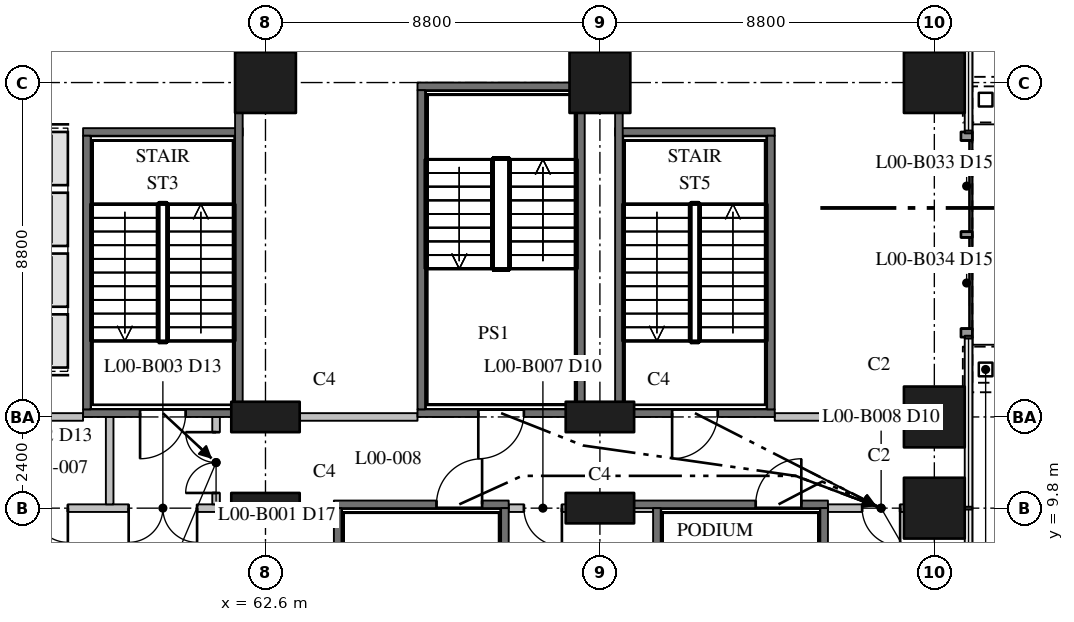
"""IFC4 building model, lengths in metres.
Left out: names, types, materials, properties, quantities, classifications, styles, units other than length and angle.
Written with IfcOpenShell. Run it as: python <this file> out.ifc"""

import sys

from ifc_helpers import new_model, si_unit, direction, frame, frame_2d, origin, origin_2d, place, context, subcontext, project, spatial, rectangle, hollow_rectangle, extrude, element, fill, save


model = new_model("IFC4")
c1 = context("Model", 3, precision=1e-05, world=origin(), true_north=direction((0.0, 1.0)))
c2 = subcontext(c1, "Body", "Model", "MODEL_VIEW")
j1 = project(units=[si_unit("LENGTHUNIT", "METRE"), si_unit("PLANEANGLEUNIT", "RADIAN")], contexts=[c1])
p1 = place(None, origin())
s1 = spatial("IfcSite", under=j1, at=p1, CompositionType="ELEMENT")
p2 = place(p1, origin())
s2 = spatial("IfcBuilding", under=s1, at=p2, CompositionType="ELEMENT")
p3 = place(p2, origin())
s3 = spatial("IfcBuildingStorey", under=s2, at=p3, CompositionType="ELEMENT", Elevation=0.0)
for number, where, z_axis, x_axis in (
    (1, (62.6, 9.8, 0.0), (0.0, 0.0, 1.0), (1.0, 0.0, 0.0)),
    (2, (62.6, 12.2, 0.0), (0.0, 0.0, 1.0), (1.0, 0.0, 0.0)),
):
    element("IfcColumn", number, at=place(p3, frame(where, z_axis=z_axis, x_axis=x_axis)), inside=s3, PredefinedType="COLUMN", context=c2, shape_type="SweptSolid", body=[
        extrude(rectangle(XDim=1.8, YDim=0.8, at=origin_2d()), origin(), (0.0, 0.0, 1.0), 7.5),
    ])
p4 = place(p3, frame((62.6, 21.0, 0.0), z_axis=(0.0, 0.0, 1.0), x_axis=(1.0, 0.0, 0.0)))
e3 = element("IfcColumn", 3, at=p4, inside=s3, PredefinedType="COLUMN", context=c2, shape_type="SweptSolid", body=[
    extrude(rectangle(XDim=1.6, YDim=1.6, at=origin_2d()), origin(), (0.0, 0.0, 1.0), 7.5),
])
for number, where, z_axis, x_axis in (
    (4, (71.4, 9.8, 0.0), (0.0, 0.0, 1.0), (1.0, 0.0, 0.0)),
    (5, (71.4, 12.2, 0.0), (0.0, 0.0, 1.0), (1.0, 0.0, 0.0)),
):
    element("IfcColumn", number, at=place(p3, frame(where, z_axis=z_axis, x_axis=x_axis)), inside=s3, PredefinedType="COLUMN", context=c2, shape_type="SweptSolid", body=[
        extrude(rectangle(XDim=1.8, YDim=0.8, at=origin_2d()), origin(), (0.0, 0.0, 1.0), 7.5),
    ])
for number, where, z_axis, x_axis in (
    (6, (71.4, 21.0, 0.0), (0.0, 0.0, 1.0), (1.0, 0.0, 0.0)),
    (7, (80.2, 9.8, 0.0), (0.0, 0.0, 1.0), (1.0, 0.0, 0.0)),
    (8, (80.2, 12.2, 0.0), (0.0, 0.0, 1.0), (1.0, 0.0, 0.0)),
    (9, (80.2, 21.0, 0.0), (0.0, 0.0, 1.0), (1.0, 0.0, 0.0)),
):
    element("IfcColumn", number, at=place(p3, frame(where, z_axis=z_axis, x_axis=x_axis)), inside=s3, PredefinedType="COLUMN", context=c2, shape_type="SweptSolid", body=[
        extrude(rectangle(XDim=1.6, YDim=1.6, at=origin_2d()), origin(), (0.0, 0.0, 1.0), 7.5),
    ])
for number, where, z_axis, x_axis in (
    (10, (81.55, 13.45, 0.0), (0.0, 0.0, 1.0), (1.0, 0.0, 0.0)),
    (11, (81.55, 20.55, 0.0), (0.0, 0.0, 1.0), (1.0, 0.0, 0.0)),
):
    element("IfcColumn", number, at=place(p3, frame(where, z_axis=z_axis, x_axis=x_axis)), inside=s3, PredefinedType="COLUMN", context=c2, shape_type="SweptSolid", body=[
        extrude(hollow_rectangle(XDim=0.356, YDim=0.356, WallThickness=0.013, at=origin_2d()), origin(), (0.0, 0.0, 1.0), 7.1),
    ])
p5 = place(p3, frame((57.8, 12.3, 0.0), z_axis=(0.0, 0.0, 1.0), x_axis=(1.0, 0.0, 0.0)))
e12 = element("IfcWall", 12, at=p5, inside=s3, PredefinedType="SHEAR", context=c2, shape_type="SweptSolid", body=[
    extrude(rectangle(XDim=4.2, YDim=0.2, at=frame_2d((2.1, 0.0))), origin(), (0.0, 0.0, 1.0), 7.1),
])
p6 = place(p5, frame((1.5, 0.0, 0.0)))
e13 = element("IfcOpeningElement", 13, at=p6, cuts=e12, PredefinedType="OPENING", context=c2, shape_type="SweptSolid", body=[
    extrude(rectangle(XDim=1.2, YDim=2.1, at=frame_2d((0.6, 1.05))), frame((0.0, 0.11, 0.0), z_axis=(0.0, -1.0, 0.0), x_axis=(1.0, 0.0, 0.0)), (0.0, 0.0, 1.0), 0.22),
])
p7 = place(p3, frame((57.8, 19.7, 0.0), z_axis=(0.0, 0.0, 1.0), x_axis=(1.0, 0.0, 0.0)))
e14 = element("IfcWall", 14, at=p7, inside=s3, PredefinedType="SHEAR", context=c2, shape_type="SweptSolid", body=[
    extrude(rectangle(XDim=4.2, YDim=0.2, at=frame_2d((2.1, 0.0))), origin(), (0.0, 0.0, 1.0), 7.1),
])
p8 = place(p3, frame((57.9, 12.4, 0.0), z_axis=(0.0, 0.0, 1.0), x_axis=(0.0, 1.0, 0.0)))
e15 = element("IfcWall", 15, at=p8, inside=s3, PredefinedType="SHEAR", context=c2, shape_type="SweptSolid", body=[
    extrude(rectangle(XDim=7.2, YDim=0.2, at=frame_2d((3.6, 0.0))), origin(), (0.0, 0.0, 1.0), 7.1),
])
p9 = place(p3, frame((61.9, 12.4, 0.0), z_axis=(0.0, 0.0, 1.0), x_axis=(0.0, 1.0, 0.0)))
e16 = element("IfcWall", 16, at=p9, inside=s3, PredefinedType="SHEAR", context=c2, shape_type="SweptSolid", body=[
    extrude(rectangle(XDim=7.8, YDim=0.2, at=frame_2d((3.9, 0.0))), origin(), (0.0, 0.0, 1.0), 7.1),
])
p10 = place(p3, frame((71.8, 12.3, 0.0), z_axis=(0.0, 0.0, 1.0), x_axis=(1.0, 0.0, 0.0)))
e17 = element("IfcWall", 17, at=p10, inside=s3, PredefinedType="SHEAR", context=c2, shape_type="SweptSolid", body=[
    extrude(rectangle(XDim=4.2, YDim=0.2, at=frame_2d((2.1, 0.0))), origin(), (0.0, 0.0, 1.0), 7.1),
])
p11 = place(p10, frame((1.5, 0.0, 0.0)))
e18 = element("IfcOpeningElement", 18, at=p11, cuts=e17, PredefinedType="OPENING", context=c2, shape_type="SweptSolid", body=[
    extrude(rectangle(XDim=1.2, YDim=2.1, at=frame_2d((0.6, 1.05))), frame((0.0, 0.11, 0.0), z_axis=(0.0, -1.0, 0.0), x_axis=(1.0, 0.0, 0.0)), (0.0, 0.0, 1.0), 0.22),
])
p12 = place(p3, frame((71.8, 19.7, 0.0), z_axis=(0.0, 0.0, 1.0), x_axis=(1.0, 0.0, 0.0)))
e19 = element("IfcWall", 19, at=p12, inside=s3, PredefinedType="SHEAR", context=c2, shape_type="SweptSolid", body=[
    extrude(rectangle(XDim=4.2, YDim=0.2, at=frame_2d((2.1, 0.0))), origin(), (0.0, 0.0, 1.0), 7.1),
])
p13 = place(p3, frame((71.9, 12.4, 0.0), z_axis=(0.0, 0.0, 1.0), x_axis=(0.0, 1.0, 0.0)))
e20 = element("IfcWall", 20, at=p13, inside=s3, PredefinedType="SHEAR", context=c2, shape_type="SweptSolid", body=[
    extrude(rectangle(XDim=7.8, YDim=0.2, at=frame_2d((3.9, 0.0))), origin(), (0.0, 0.0, 1.0), 7.1),
])
p14 = place(p3, frame((75.9, 12.4, 0.0), z_axis=(0.0, 0.0, 1.0), x_axis=(0.0, 1.0, 0.0)))
e21 = element("IfcWall", 21, at=p14, inside=s3, PredefinedType="SHEAR", context=c2, shape_type="SweptSolid", body=[
    extrude(rectangle(XDim=7.2, YDim=0.2, at=frame_2d((3.6, 0.0))), origin(), (0.0, 0.0, 1.0), 7.1),
])
p15 = place(p3, frame((66.6, 12.3, 0.0), z_axis=(0.0, 0.0, 1.0), x_axis=(1.0, 0.0, 0.0)))
e22 = element("IfcWall", 22, at=p15, inside=s3, PredefinedType="SHEAR", context=c2, shape_type="SweptSolid", body=[
    extrude(rectangle(XDim=4.4, YDim=0.2, at=frame_2d((2.2, 0.0))), origin(), (0.0, 0.0, 1.0), 7.1),
])
p16 = place(p15, frame((1.6, 0.0, 0.0)))
e23 = element("IfcOpeningElement", 23, at=p16, cuts=e22, PredefinedType="OPENING", context=c2, shape_type="SweptSolid", body=[
    extrude(rectangle(XDim=1.2, YDim=2.1, at=frame_2d((0.6, 1.05))), frame((0.0, 0.11, 0.0), z_axis=(0.0, -1.0, 0.0), x_axis=(1.0, 0.0, 0.0)), (0.0, 0.0, 1.0), 0.22),
])
p17 = place(p3, frame((66.6, 20.9, 0.0), z_axis=(0.0, 0.0, 1.0), x_axis=(1.0, 0.0, 0.0)))
e24 = element("IfcWall", 24, at=p17, inside=s3, PredefinedType="SHEAR", context=c2, shape_type="SweptSolid", body=[
    extrude(rectangle(XDim=4.4, YDim=0.2, at=frame_2d((2.2, 0.0))), origin(), (0.0, 0.0, 1.0), 7.1),
])
for number, where, z_axis, x_axis in (
    (25, (66.7, 12.4, 0.0), (0.0, 0.0, 1.0), (0.0, 1.0, 0.0)),
    (26, (70.9, 12.4, 0.0), (0.0, 0.0, 1.0), (0.0, 1.0, 0.0)),
):
    element("IfcWall", number, at=place(p3, frame(where, z_axis=z_axis, x_axis=x_axis)), inside=s3, PredefinedType="SHEAR", context=c2, shape_type="SweptSolid", body=[
        extrude(rectangle(XDim=8.4, YDim=0.2, at=frame_2d((4.2, 0.0))), origin(), (0.0, 0.0, 1.0), 7.1),
    ])
p18 = place(p3, frame((64.4, 9.9, 0.0), z_axis=(0.0, 0.0, 1.0), x_axis=(1.0, 0.0, 0.0)))
e27 = element("IfcWall", 27, at=p18, inside=s3, PredefinedType="SHEAR", context=c2, shape_type="SweptSolid", body=[
    extrude(rectangle(XDim=4.6, YDim=0.2, at=frame_2d((2.3, 0.0))), origin(), (0.0, 0.0, 1.0), 7.1),
])
p19 = place(p18, frame((2.7, 0.0, 0.0)))
e28 = element("IfcOpeningElement", 28, at=p19, cuts=e27, PredefinedType="OPENING", context=c2, shape_type="SweptSolid", body=[
    extrude(rectangle(XDim=1.2, YDim=2.1, at=frame_2d((0.6, 1.05))), frame((0.0, 0.11, 0.0), z_axis=(0.0, -1.0, 0.0), x_axis=(1.0, 0.0, 0.0)), (0.0, 0.0, 1.0), 0.22),
])
for number, where, z_axis, x_axis in (
    (29, (64.5, 1.4, 0.0), (0.0, 0.0, 1.0), (0.0, 1.0, 0.0)),
    (30, (68.9, 1.4, 0.0), (0.0, 0.0, 1.0), (0.0, 1.0, 0.0)),
):
    element("IfcWall", number, at=place(p3, frame(where, z_axis=z_axis, x_axis=x_axis)), inside=s3, PredefinedType="SHEAR", context=c2, shape_type="SweptSolid", body=[
        extrude(rectangle(XDim=8.4, YDim=0.2, at=frame_2d((4.2, 0.0))), origin(), (0.0, 0.0, 1.0), 7.1),
    ])
p20 = place(p3, frame((72.3, 9.9, 0.0), z_axis=(0.0, 0.0, 1.0), x_axis=(1.0, 0.0, 0.0)))
e31 = element("IfcWall", 31, at=p20, inside=s3, PredefinedType="SHEAR", context=c2, shape_type="SweptSolid", body=[
    extrude(rectangle(XDim=5.1, YDim=0.2, at=frame_2d((2.55, 0.0))), origin(), (0.0, 0.0, 1.0), 7.1),
])
p21 = place(p20, frame((3.2, 0.0, 0.0)))
e32 = element("IfcOpeningElement", 32, at=p21, cuts=e31, PredefinedType="OPENING", context=c2, shape_type="SweptSolid", body=[
    extrude(rectangle(XDim=1.2, YDim=2.1, at=frame_2d((0.6, 1.05))), frame((0.0, 0.11, 0.0), z_axis=(0.0, -1.0, 0.0), x_axis=(1.0, 0.0, 0.0)), (0.0, 0.0, 1.0), 0.22),
])
for number, where, z_axis, x_axis in (
    (33, (72.9, 1.4, 0.0), (0.0, 0.0, 1.0), (0.0, 1.0, 0.0)),
    (34, (77.3, 1.4, 0.0), (0.0, 0.0, 1.0), (0.0, 1.0, 0.0)),
):
    element("IfcWall", number, at=place(p3, frame(where, z_axis=z_axis, x_axis=x_axis)), inside=s3, PredefinedType="SHEAR", context=c2, shape_type="SweptSolid", body=[
        extrude(rectangle(XDim=8.4, YDim=0.2, at=frame_2d((4.2, 0.0))), origin(), (0.0, 0.0, 1.0), 7.1),
    ])
p22 = place(p3, frame((45.0, 9.8, 0.0), z_axis=(0.0, 0.0, 1.0), x_axis=(1.0, 0.0, 0.0)))
e35 = element("IfcWall", 35, at=p22, inside=s3, PredefinedType="PARTITIONING", context=c2, shape_type="SweptSolid", body=[
    extrude(rectangle(XDim=19.4, YDim=0.2, at=frame_2d((9.7, 0.0))), origin(), (0.0, 0.0, 1.0), 7.1),
])
p23 = place(p22, frame((10.6, 0.0, 0.0)))
e36 = element("IfcOpeningElement", 36, at=p23, cuts=e35, PredefinedType="OPENING", context=c2, shape_type="SweptSolid", body=[
    extrude(rectangle(XDim=1.8, YDim=2.1, at=frame_2d((0.9, 1.05))), frame((0.0, 0.11, 0.0), z_axis=(0.0, -1.0, 0.0), x_axis=(1.0, 0.0, 0.0)), (0.0, 0.0, 1.0), 0.22),
])
p24 = place(p22, frame((14.0, 0.0, 0.0)))
e37 = element("IfcOpeningElement", 37, at=p24, cuts=e35, PredefinedType="OPENING", context=c2, shape_type="SweptSolid", body=[
    extrude(rectangle(XDim=1.8, YDim=2.1, at=frame_2d((0.9, 1.05))), frame((0.0, 0.11, 0.0), z_axis=(0.0, -1.0, 0.0), x_axis=(1.0, 0.0, 0.0)), (0.0, 0.0, 1.0), 0.22),
])
p25 = place(p3, frame((69.0, 9.8, 0.0), z_axis=(0.0, 0.0, 1.0), x_axis=(1.0, 0.0, 0.0)))
e38 = element("IfcWall", 38, at=p25, inside=s3, PredefinedType="PARTITIONING", context=c2, shape_type="SweptSolid", body=[
    extrude(rectangle(XDim=3.8, YDim=0.2, at=frame_2d((1.9, 0.0))), origin(), (0.0, 0.0, 1.0), 7.1),
])
p26 = place(p25, frame((0.4, 0.0, 0.0)))
e39 = element("IfcOpeningElement", 39, at=p26, cuts=e38, PredefinedType="OPENING", context=c2, shape_type="SweptSolid", body=[
    extrude(rectangle(XDim=1.0, YDim=2.1, at=frame_2d((0.5, 1.05))), frame((0.0, 0.11, 0.0), z_axis=(0.0, -1.0, 0.0), x_axis=(1.0, 0.0, 0.0)), (0.0, 0.0, 1.0), 0.22),
])
p27 = place(p3, frame((77.4, 9.8, 0.0), z_axis=(0.0, 0.0, 1.0), x_axis=(1.0, 0.0, 0.0)))
e40 = element("IfcWall", 40, at=p27, inside=s3, PredefinedType="PARTITIONING", context=c2, shape_type="SweptSolid", body=[
    extrude(rectangle(XDim=3.6, YDim=0.2, at=frame_2d((1.8, 0.0))), origin(), (0.0, 0.0, 1.0), 7.1),
])
p28 = place(p27, frame((0.9, 0.0, 0.0)))
e41 = element("IfcOpeningElement", 41, at=p28, cuts=e40, PredefinedType="OPENING", context=c2, shape_type="SweptSolid", body=[
    extrude(rectangle(XDim=1.0, YDim=2.1, at=frame_2d((0.5, 1.05))), frame((0.0, 0.11, 0.0), z_axis=(0.0, -1.0, 0.0), x_axis=(1.0, 0.0, 0.0)), (0.0, 0.0, 1.0), 0.22),
])
p29 = place(p3, frame((35.4, 12.2, 0.0), z_axis=(0.0, 0.0, 1.0), x_axis=(1.0, 0.0, 0.0)))
e42 = element("IfcWall", 42, at=p29, inside=s3, PredefinedType="PARTITIONING", context=c2, shape_type="SweptSolid", body=[
    extrude(rectangle(XDim=22.4, YDim=0.2, at=frame_2d((11.2, 0.0))), origin(), (0.0, 0.0, 1.0), 7.1),
])
p30 = place(p3, frame((62.0, 12.2, 0.0), z_axis=(0.0, 0.0, 1.0), x_axis=(1.0, 0.0, 0.0)))
e43 = element("IfcWall", 43, at=p30, inside=s3, PredefinedType="PARTITIONING", context=c2, shape_type="SweptSolid", body=[
    extrude(rectangle(XDim=4.6, YDim=0.2, at=frame_2d((2.3, 0.0))), origin(), (0.0, 0.0, 1.0), 7.1),
])
p31 = place(p3, frame((71.0, 12.2, 0.0), z_axis=(0.0, 0.0, 1.0), x_axis=(1.0, 0.0, 0.0)))
e44 = element("IfcWall", 44, at=p31, inside=s3, PredefinedType="PARTITIONING", context=c2, shape_type="SweptSolid", body=[
    extrude(rectangle(XDim=0.8, YDim=0.2, at=frame_2d((0.4, 0.0))), origin(), (0.0, 0.0, 1.0), 7.1),
])
p32 = place(p3, frame((76.0, 12.2, 0.0), z_axis=(0.0, 0.0, 1.0), x_axis=(1.0, 0.0, 0.0)))
e45 = element("IfcWall", 45, at=p32, inside=s3, PredefinedType="PARTITIONING", context=c2, shape_type="SweptSolid", body=[
    extrude(rectangle(XDim=5.0, YDim=0.2, at=frame_2d((2.5, 0.0))), origin(), (0.0, 0.0, 1.0), 7.1),
])
p33 = place(p3, frame((58.5, 9.9, 0.0), z_axis=(0.0, 0.0, 1.0), x_axis=(0.0, 1.0, 0.0)))
e46 = element("IfcWall", 46, at=p33, inside=s3, PredefinedType="PARTITIONING", context=c2, shape_type="SweptSolid", body=[
    extrude(rectangle(XDim=2.3, YDim=0.2, at=frame_2d((1.15, 0.0))), origin(), (0.0, 0.0, 1.0), 7.1),
])
p34 = place(p3, frame((61.3, 9.9, 0.0), z_axis=(0.0, 0.0, 1.0), x_axis=(0.0, 1.0, 0.0)))
e47 = element("IfcWall", 47, at=p34, inside=s3, PredefinedType="PARTITIONING", context=c2, shape_type="SweptSolid", body=[
    extrude(rectangle(XDim=2.3, YDim=0.2, at=frame_2d((1.15, 0.0))), origin(), (0.0, 0.0, 1.0), 7.1),
])
p35 = place(p34, frame((0.3, 0.0, 0.0)))
e48 = element("IfcOpeningElement", 48, at=p35, cuts=e47, PredefinedType="OPENING", context=c2, shape_type="SweptSolid", body=[
    extrude(rectangle(XDim=1.6, YDim=2.1, at=frame_2d((0.8, 1.05))), frame((0.0, 0.11, 0.0), z_axis=(0.0, -1.0, 0.0), x_axis=(1.0, 0.0, 0.0)), (0.0, 0.0, 1.0), 0.22),
])
p36 = place(p3, frame((81.05, 19.7, 0.0), z_axis=(0.0, 0.0, 1.0), x_axis=(0.0, -1.0, 0.0)))
e49 = element("IfcWall", 49, at=p36, inside=s3, PredefinedType="STANDARD", context=c2, shape_type="SweptSolid", body=[
    extrude(rectangle(XDim=5.4, YDim=0.3, at=frame_2d((2.7, 0.0))), origin(), (0.0, 0.0, 1.0), 7.1),
])
p37 = place(p36, frame((0.225, 0.0, 0.0)))
e50 = element("IfcOpeningElement", 50, at=p37, cuts=e49, PredefinedType="OPENING", context=c2, shape_type="SweptSolid", body=[
    extrude(rectangle(XDim=2.4, YDim=2.4, at=frame_2d((1.2, 1.2))), frame((0.0, 0.16, 0.0), z_axis=(0.0, -1.0, 0.0), x_axis=(1.0, 0.0, 0.0)), (0.0, 0.0, 1.0), 0.32),
])
p38 = place(p36, frame((2.775, 0.0, 0.0)))
e51 = element("IfcOpeningElement", 51, at=p38, cuts=e49, PredefinedType="OPENING", context=c2, shape_type="SweptSolid", body=[
    extrude(rectangle(XDim=2.4, YDim=2.4, at=frame_2d((1.2, 1.2))), frame((0.0, 0.16, 0.0), z_axis=(0.0, -1.0, 0.0), x_axis=(1.0, 0.0, 0.0)), (0.0, 0.0, 1.0), 0.32),
])
p39 = place(p6, frame((1.2, 0.0, 0.0), z_axis=(0.0, 0.0, 1.0), x_axis=(-1.0, 0.0, 0.0)))
e52 = element("IfcDoor", 52, at=p39, inside=s3, OperationType="SINGLE_SWING_LEFT", PredefinedType="DOOR", context=c2, shape_type="SweptSolid", body=[
    extrude(rectangle(XDim=1.2, YDim=2.1, at=frame_2d((0.6, 1.05))), frame((0.0, 0.025, 0.0), z_axis=(0.0, -1.0, 0.0), x_axis=(1.0, 0.0, 0.0)), (0.0, 0.0, 1.0), 0.05),
])
fill(e13, e52)
p40 = place(p11, frame((1.2, 0.0, 0.0), z_axis=(0.0, 0.0, 1.0), x_axis=(-1.0, 0.0, 0.0)))
e53 = element("IfcDoor", 53, at=p40, inside=s3, OperationType="SINGLE_SWING_LEFT", PredefinedType="DOOR", context=c2, shape_type="SweptSolid", body=[
    extrude(rectangle(XDim=1.2, YDim=2.1, at=frame_2d((0.6, 1.05))), frame((0.0, 0.025, 0.0), z_axis=(0.0, -1.0, 0.0), x_axis=(1.0, 0.0, 0.0)), (0.0, 0.0, 1.0), 0.05),
])
fill(e18, e53)
p41 = place(p16, frame((1.2, 0.0, 0.0), z_axis=(0.0, 0.0, 1.0), x_axis=(-1.0, 0.0, 0.0)))
e54 = element("IfcDoor", 54, at=p41, inside=s3, OperationType="SINGLE_SWING_LEFT", PredefinedType="DOOR", context=c2, shape_type="SweptSolid", body=[
    extrude(rectangle(XDim=1.2, YDim=2.1, at=frame_2d((0.6, 1.05))), frame((0.0, 0.025, 0.0), z_axis=(0.0, -1.0, 0.0), x_axis=(1.0, 0.0, 0.0)), (0.0, 0.0, 1.0), 0.05),
])
fill(e23, e54)
p42 = place(p19, origin())
e55 = element("IfcDoor", 55, at=p42, inside=s3, OperationType="SINGLE_SWING_RIGHT", PredefinedType="DOOR", context=c2, shape_type="SweptSolid", body=[
    extrude(rectangle(XDim=1.2, YDim=2.1, at=frame_2d((0.6, 1.05))), frame((0.0, 0.025, 0.0), z_axis=(0.0, -1.0, 0.0), x_axis=(1.0, 0.0, 0.0)), (0.0, 0.0, 1.0), 0.05),
])
fill(e28, e55)
p43 = place(p21, origin())
e56 = element("IfcDoor", 56, at=p43, inside=s3, OperationType="SINGLE_SWING_RIGHT", PredefinedType="DOOR", context=c2, shape_type="SweptSolid", body=[
    extrude(rectangle(XDim=1.2, YDim=2.1, at=frame_2d((0.6, 1.05))), frame((0.0, 0.025, 0.0), z_axis=(0.0, -1.0, 0.0), x_axis=(1.0, 0.0, 0.0)), (0.0, 0.0, 1.0), 0.05),
])
fill(e32, e56)
p44 = place(p35, origin())
e57 = element("IfcDoor", 57, at=p44, inside=s3, OperationType="DOUBLE_DOOR_SINGLE_SWING", PredefinedType="DOOR", context=c2, shape_type="SweptSolid", body=[
    extrude(rectangle(XDim=1.6, YDim=2.1, at=frame_2d((0.8, 1.05))), frame((0.0, 0.025, 0.0), z_axis=(0.0, -1.0, 0.0), x_axis=(1.0, 0.0, 0.0)), (0.0, 0.0, 1.0), 0.05),
])
fill(e48, e57)
p45 = place(p23, frame((1.8, 0.0, 0.0), z_axis=(0.0, 0.0, 1.0), x_axis=(-1.0, 0.0, 0.0)))
e58 = element("IfcDoor", 58, at=p45, inside=s3, OperationType="DOUBLE_DOOR_SINGLE_SWING", PredefinedType="DOOR", context=c2, shape_type="SweptSolid", body=[
    extrude(rectangle(XDim=1.8, YDim=2.1, at=frame_2d((0.9, 1.05))), frame((0.0, 0.025, 0.0), z_axis=(0.0, -1.0, 0.0), x_axis=(1.0, 0.0, 0.0)), (0.0, 0.0, 1.0), 0.05),
])
fill(e36, e58)
p46 = place(p24, frame((1.8, 0.0, 0.0), z_axis=(0.0, 0.0, 1.0), x_axis=(-1.0, 0.0, 0.0)))
e59 = element("IfcDoor", 59, at=p46, inside=s3, OperationType="DOUBLE_DOOR_SINGLE_SWING", PredefinedType="DOOR", context=c2, shape_type="SweptSolid", body=[
    extrude(rectangle(XDim=1.8, YDim=2.1, at=frame_2d((0.9, 1.05))), frame((0.0, 0.025, 0.0), z_axis=(0.0, -1.0, 0.0), x_axis=(1.0, 0.0, 0.0)), (0.0, 0.0, 1.0), 0.05),
])
fill(e37, e59)
p47 = place(p26, frame((1.0, 0.0, 0.0), z_axis=(0.0, 0.0, 1.0), x_axis=(-1.0, 0.0, 0.0)))
e60 = element("IfcDoor", 60, at=p47, inside=s3, OperationType="SINGLE_SWING_RIGHT", PredefinedType="DOOR", context=c2, shape_type="SweptSolid", body=[
    extrude(rectangle(XDim=1.0, YDim=2.1, at=frame_2d((0.5, 1.05))), frame((0.0, 0.025, 0.0), z_axis=(0.0, -1.0, 0.0), x_axis=(1.0, 0.0, 0.0)), (0.0, 0.0, 1.0), 0.05),
])
fill(e39, e60)
p48 = place(p28, frame((1.0, 0.0, 0.0), z_axis=(0.0, 0.0, 1.0), x_axis=(-1.0, 0.0, 0.0)))
e61 = element("IfcDoor", 61, at=p48, inside=s3, OperationType="SINGLE_SWING_RIGHT", PredefinedType="DOOR", context=c2, shape_type="SweptSolid", body=[
    extrude(rectangle(XDim=1.0, YDim=2.1, at=frame_2d((0.5, 1.05))), frame((0.0, 0.025, 0.0), z_axis=(0.0, -1.0, 0.0), x_axis=(1.0, 0.0, 0.0)), (0.0, 0.0, 1.0), 0.05),
])
fill(e41, e61)
p49 = place(p37, origin())
e62 = element("IfcDoor", 62, at=p49, inside=s3, OperationType="DOUBLE_DOOR_SLIDING", PredefinedType="DOOR", context=c2, shape_type="SweptSolid", body=[
    extrude(rectangle(XDim=2.4, YDim=2.4, at=frame_2d((1.2, 1.2))), frame((0.0, 0.025, 0.0), z_axis=(0.0, -1.0, 0.0), x_axis=(1.0, 0.0, 0.0)), (0.0, 0.0, 1.0), 0.05),
])
fill(e50, e62)
p50 = place(p38, origin())
e63 = element("IfcDoor", 63, at=p50, inside=s3, OperationType="DOUBLE_DOOR_SLIDING", PredefinedType="DOOR", context=c2, shape_type="SweptSolid", body=[
    extrude(rectangle(XDim=2.4, YDim=2.4, at=frame_2d((1.2, 1.2))), frame((0.0, 0.025, 0.0), z_axis=(0.0, -1.0, 0.0), x_axis=(1.0, 0.0, 0.0)), (0.0, 0.0, 1.0), 0.05),
])
fill(e51, e63)
save(model, sys.argv[1])
